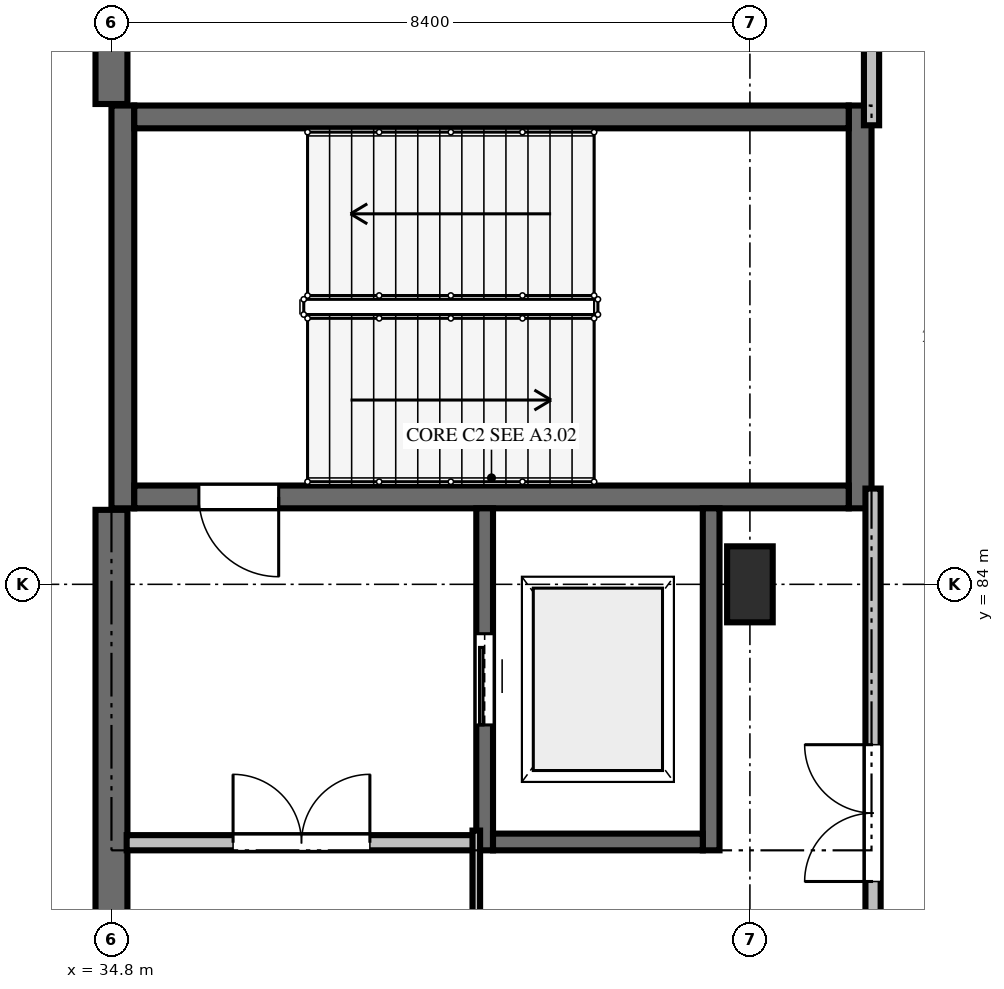
"""IFC4 building model, lengths in metres.
Left out: names, types, materials, properties, quantities, classifications, styles, units other than length and angle.
Written with IfcOpenShell. Run it as: python <this file> out.ifc"""

import sys

from ifc_helpers import new_model, si_unit, direction, frame, frame_2d, origin, origin_2d, place, context, subcontext, project, spatial, rectangle, extrude, element, fill, save


model = new_model("IFC4")
c1 = context("Model", 3, precision=1e-05, world=origin(), true_north=direction((0.0, 1.0)))
c2 = subcontext(c1, "Body", "Model", "MODEL_VIEW")
j1 = project(units=[si_unit("LENGTHUNIT", "METRE"), si_unit("PLANEANGLEUNIT", "RADIAN")], contexts=[c1])
p1 = place(None, origin())
s1 = spatial("IfcSite", under=j1, at=p1, CompositionType="ELEMENT")
p2 = place(p1, origin())
s2 = spatial("IfcBuilding", under=s1, at=p2, CompositionType="ELEMENT")
p3 = place(p2, frame((0.0, 0.0, -4.8)))
s3 = spatial("IfcBuildingStorey", under=s2, at=p3, CompositionType="ELEMENT", Elevation=-4.8)
p4 = place(p3, frame((43.2, 84.0, 0.0), z_axis=(0.0, 0.0, 1.0), x_axis=(1.0, 0.0, 0.0)))
e1 = element("IfcColumn", 1, at=p4, inside=s3, PredefinedType="COLUMN", context=c2, shape_type="SweptSolid", body=[
    extrude(rectangle(XDim=0.6, YDim=1.0, at=origin_2d()), origin(), (0.0, 0.0, 1.0), 4.8),
])
p5 = place(p3, frame((34.8, 91.39, 0.0), z_axis=(0.0, 0.0, 1.0), x_axis=(0.0, -1.0, 0.0)))
e2 = element("IfcWall", 2, at=p5, inside=s3, PredefinedType="USERDEFINED", context=c2, shape_type="SweptSolid", body=[
    extrude(rectangle(XDim=1.07, YDim=0.42, at=frame_2d((0.535, 0.0))), origin(), (0.0, 0.0, 1.0), 4.32),
])
p6 = place(p3, frame((34.8, 84.98, 0.0), z_axis=(0.0, 0.0, 1.0), x_axis=(0.0, -1.0, 0.0)))
e3 = element("IfcWall", 3, at=p6, inside=s3, PredefinedType="USERDEFINED", context=c2, shape_type="SweptSolid", body=[
    extrude(rectangle(XDim=8.676, YDim=0.42, at=frame_2d((4.338, 0.0))), origin(), (0.0, 0.0, 1.0), 4.32),
])
for number, where, z_axis, x_axis in (
    (4, (34.95, 85.0, 0.0), (0.0, 0.0, 1.0), (0.0, 1.0, 0.0)),
    (5, (44.65, 90.3, 0.0), (0.0, 0.0, 1.0), (0.0, -1.0, 0.0)),
):
    element("IfcWall", number, at=place(p3, frame(where, z_axis=z_axis, x_axis=x_axis)), inside=s3, PredefinedType="SHEAR", context=c2, shape_type="SweptSolid", body=[
        extrude(rectangle(XDim=5.3, YDim=0.3, at=frame_2d((2.65, 0.0))), origin(), (0.0, 0.0, 1.0), 4.51),
    ])
p7 = place(p3, frame((44.5, 85.15, 0.0), z_axis=(0.0, 0.0, 1.0), x_axis=(-1.0, 0.0, 0.0)))
e6 = element("IfcWall", 6, at=p7, inside=s3, PredefinedType="SHEAR", context=c2, shape_type="SweptSolid", body=[
    extrude(rectangle(XDim=9.4, YDim=0.3, at=frame_2d((4.7, 0.0))), origin(), (0.0, 0.0, 1.0), 4.51),
])
p8 = place(p7, frame((7.5, 0.0, 0.0)))
e7 = element("IfcOpeningElement", 7, at=p8, cuts=e6, PredefinedType="OPENING", context=c2, shape_type="SweptSolid", body=[
    extrude(rectangle(XDim=1.05, YDim=2.2, at=frame_2d((0.525, 1.1))), frame((0.0, 0.16, 0.0), z_axis=(0.0, -1.0, 0.0), x_axis=(1.0, 0.0, 0.0)), (0.0, 0.0, 1.0), 0.32),
])
p9 = place(p3, frame((35.1, 90.15, 0.0), z_axis=(0.0, 0.0, 1.0), x_axis=(1.0, 0.0, 0.0)))
e8 = element("IfcWall", 8, at=p9, inside=s3, PredefinedType="SHEAR", context=c2, shape_type="SweptSolid", body=[
    extrude(rectangle(XDim=9.4, YDim=0.3, at=frame_2d((4.7, 0.0))), origin(), (0.0, 0.0, 1.0), 4.51),
])
p10 = place(p3, frame((35.0, 80.6, 0.0), z_axis=(0.0, 0.0, 1.0), x_axis=(1.0, 0.0, 0.0)))
e9 = element("IfcWall", 9, at=p10, inside=s3, PredefinedType="SOLIDWALL", context=c2, shape_type="SweptSolid", body=[
    extrude(rectangle(XDim=4.6, YDim=0.2, at=frame_2d((2.3, 0.0))), origin(), (0.0, 0.0, 1.0), 3.77),
])
p11 = place(p10, frame((1.4, 0.0, 0.0)))
e10 = element("IfcOpeningElement", 10, at=p11, cuts=e9, PredefinedType="OPENING", context=c2, shape_type="SweptSolid", body=[
    extrude(rectangle(XDim=1.8, YDim=2.2, at=frame_2d((0.9, 1.1))), frame((0.0, 0.11, 0.0), z_axis=(0.0, -1.0, 0.0), x_axis=(1.0, 0.0, 0.0)), (0.0, 0.0, 1.0), 0.22),
])
p12 = place(p3, frame((39.71, 80.5, 0.0), z_axis=(0.0, 0.0, 1.0), x_axis=(0.0, 1.0, 0.0)))
e11 = element("IfcWall", 11, at=p12, inside=s3, PredefinedType="SOLIDWALL", context=c2, shape_type="SweptSolid", body=[
    extrude(rectangle(XDim=4.5, YDim=0.22, at=frame_2d((2.25, 0.0))), origin(), (0.0, 0.0, 1.0), 4.51),
])
p13 = place(p12, frame((1.65, 0.0, 0.0)))
e12 = element("IfcOpeningElement", 12, at=p13, cuts=e11, PredefinedType="OPENING", context=c2, shape_type="SweptSolid", body=[
    extrude(rectangle(XDim=1.2, YDim=2.2, at=frame_2d((0.6, 1.1))), frame((0.0, 0.12, 0.0), z_axis=(0.0, -1.0, 0.0), x_axis=(1.0, 0.0, 0.0)), (0.0, 0.0, 1.0), 0.24),
])
p14 = place(p3, frame((42.69, 80.5, 0.0), z_axis=(0.0, 0.0, 1.0), x_axis=(0.0, 1.0, 0.0)))
e13 = element("IfcWall", 13, at=p14, inside=s3, PredefinedType="SOLIDWALL", context=c2, shape_type="SweptSolid", body=[
    extrude(rectangle(XDim=4.5, YDim=0.22, at=frame_2d((2.25, 0.0))), origin(), (0.0, 0.0, 1.0), 4.51),
])
p15 = place(p3, frame((39.82, 80.61, 0.0), z_axis=(0.0, 0.0, 1.0), x_axis=(1.0, 0.0, 0.0)))
e14 = element("IfcWall", 14, at=p15, inside=s3, PredefinedType="SOLIDWALL", context=c2, shape_type="SweptSolid", body=[
    extrude(rectangle(XDim=2.76, YDim=0.22, at=frame_2d((1.38, 0.0))), origin(), (0.0, 0.0, 1.0), 4.51),
])
p16 = place(p3, frame((44.82, 76.72, 0.0), z_axis=(0.0, 0.0, 1.0), x_axis=(0.0, 1.0, 0.0)))
e15 = element("IfcWall", 15, at=p16, inside=s3, PredefinedType="SOLIDWALL", context=c2, shape_type="SweptSolid", body=[
    extrude(rectangle(XDim=8.54, YDim=0.2, at=frame_2d((4.27, 0.0))), origin(), (0.0, 0.0, 1.0), 3.37),
])
p17 = place(p16, frame((3.37, 0.0, 0.0)))
e16 = element("IfcOpeningElement", 16, at=p17, cuts=e15, PredefinedType="OPENING", context=c2, shape_type="SweptSolid", body=[
    extrude(rectangle(XDim=1.8, YDim=2.3, at=frame_2d((0.9, 1.15))), frame((0.0, 0.11, 0.0), z_axis=(0.0, -1.0, 0.0), x_axis=(1.0, 0.0, 0.0)), (0.0, 0.0, 1.0), 0.22),
])
p18 = place(p3, frame((44.8, 90.04, 0.0), z_axis=(0.0, 0.0, 1.0), x_axis=(0.0, 1.0, 0.0)))
e17 = element("IfcWall", 17, at=p18, inside=s3, PredefinedType="SOLIDWALL", context=c2, shape_type="SweptSolid", body=[
    extrude(rectangle(XDim=1.634, YDim=0.2, at=frame_2d((0.817, 0.0))), origin(), (0.0, 0.0, 1.0), 3.52),
])
p19 = place(p3, frame((39.6, 51.4, 0.0), z_axis=(0.0, 0.0, 1.0), x_axis=(0.0, 1.0, 0.0)))
e18 = element("IfcWall", 18, at=p19, inside=s3, PredefinedType="PARTITIONING", context=c2, shape_type="SweptSolid", body=[
    extrude(rectangle(XDim=29.36, YDim=0.1, at=frame_2d((14.68, 0.0))), origin(), (0.0, 0.0, 1.0), 3.72),
])
p20 = place(p8, origin())
e19 = element("IfcDoor", 19, at=p20, inside=s3, OperationType="SINGLE_SWING_LEFT", PredefinedType="DOOR", context=c2, shape_type="SweptSolid", body=[
    extrude(rectangle(XDim=1.05, YDim=2.2, at=frame_2d((0.525, 1.1))), frame((0.0, 0.025, 0.0), z_axis=(0.0, -1.0, 0.0), x_axis=(1.0, 0.0, 0.0)), (0.0, 0.0, 1.0), 0.05),
])
fill(e7, e19)
p21 = place(p11, origin())
e20 = element("IfcDoor", 20, at=p21, inside=s3, OperationType="DOUBLE_DOOR_SINGLE_SWING", PredefinedType="DOOR", context=c2, shape_type="SweptSolid", body=[
    extrude(rectangle(XDim=1.8, YDim=2.2, at=frame_2d((0.9, 1.1))), frame((0.0, 0.025, 0.0), z_axis=(0.0, -1.0, 0.0), x_axis=(1.0, 0.0, 0.0)), (0.0, 0.0, 1.0), 0.05),
])
fill(e10, e20)
p22 = place(p13, origin())
e21 = element("IfcDoor", 21, at=p22, inside=s3, OperationType="SLIDING_TO_LEFT", PredefinedType="DOOR", context=c2, shape_type="SweptSolid", body=[
    extrude(rectangle(XDim=1.2, YDim=2.2, at=frame_2d((0.6, 1.1))), frame((0.0, 0.025, 0.0), z_axis=(0.0, -1.0, 0.0), x_axis=(1.0, 0.0, 0.0)), (0.0, 0.0, 1.0), 0.05),
])
fill(e12, e21)
p23 = place(p17, origin())
e22 = element("IfcDoor", 22, at=p23, inside=s3, OperationType="DOUBLE_DOOR_SINGLE_SWING", PredefinedType="DOOR", context=c2, shape_type="SweptSolid", body=[
    extrude(rectangle(XDim=1.8, YDim=2.3, at=frame_2d((0.9, 1.15))), frame((0.0, 0.025, 0.0), z_axis=(0.0, -1.0, 0.0), x_axis=(1.0, 0.0, 0.0)), (0.0, 0.0, 1.0), 0.05),
])
fill(e16, e22)
save(model, sys.argv[1])
